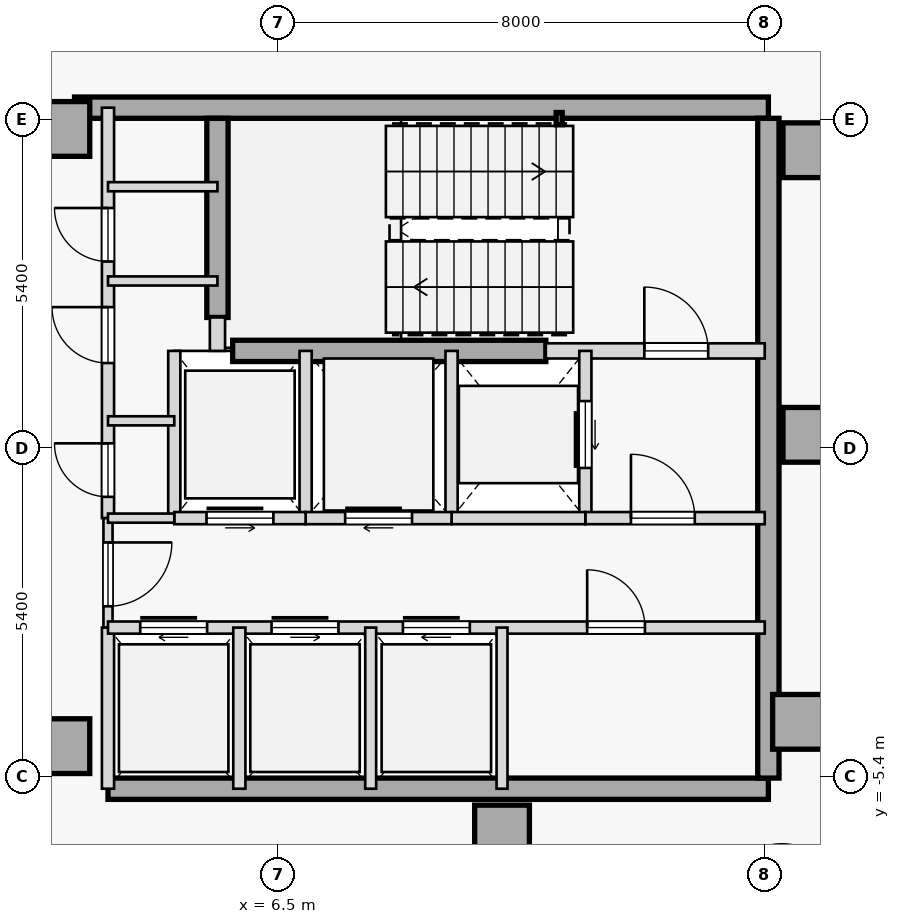
"""IFC4 building model, lengths in metres.
Left out: names, types, materials, properties, quantities, classifications, styles, units other than length and angle.
Written with IfcOpenShell. Run it as: python <this file> out.ifc"""

import sys

from ifc_helpers import new_model, si_unit, direction, frame, frame_2d, origin, origin_2d, place, context, subcontext, project, spatial, rectangle, hollow_rectangle, extrude, element, fill, save


model = new_model("IFC4")
c1 = context("Model", 3, precision=1e-05, world=origin(), true_north=direction((0.0, 1.0)))
c2 = subcontext(c1, "Body", "Model", "MODEL_VIEW")
j1 = project(units=[si_unit("LENGTHUNIT", "METRE"), si_unit("PLANEANGLEUNIT", "RADIAN")], contexts=[c1])
p1 = place(None, origin())
s1 = spatial("IfcSite", under=j1, at=p1, CompositionType="ELEMENT")
p2 = place(p1, origin())
s2 = spatial("IfcBuilding", under=s1, at=p2, CompositionType="ELEMENT")
p3 = place(p2, frame((0.0, 0.0, 206.8)))
s3 = spatial("IfcBuildingStorey", under=s2, at=p3, CompositionType="ELEMENT", Elevation=206.8)
for number, where, z_axis, x_axis in (
    (1, (15.25, 4.9, 0.0), (0.0, 0.0, 1.0), (1.0, 0.0, 0.0)),
    (2, (15.25, 0.22, 0.0), (0.0, 0.0, 1.0), (1.0, 0.0, 0.0)),
    (3, (15.08, -4.5, 0.0), (0.0, 0.0, 1.0), (1.0, 0.0, 0.0)),
    (4, (10.18, -6.32, 0.0), (0.0, 0.0, 1.0), (1.0, 0.0, 0.0)),
    (5, (2.95, -4.9, 0.0), (0.0, 0.0, 1.0), (1.0, 0.0, 0.0)),
    (6, (2.95, 5.25, 0.0), (0.0, 0.0, 1.0), (1.0, 0.0, 0.0)),
):
    element("IfcColumn", number, at=place(p3, frame(where, z_axis=z_axis, x_axis=x_axis)), inside=s3, PredefinedType="COLUMN", context=c2, shape_type="SweptSolid", body=[
        extrude(rectangle(XDim=0.9, YDim=0.9, at=origin_2d()), origin(), (0.0, 0.0, 1.0), 4.1),
    ])
p4 = place(p3, frame((3.15, 5.6, 0.0), z_axis=(0.0, 0.0, 1.0), x_axis=(1.0, 0.0, 0.0)))
e7 = element("IfcWall", 7, at=p4, inside=s3, PredefinedType="SHEAR", context=c2, shape_type="SweptSolid", body=[
    extrude(rectangle(XDim=11.41, YDim=0.35, at=frame_2d((5.705, 0.0))), origin(), (0.0, 0.0, 1.0), 3.875),
])
p5 = place(p3, frame((3.7, -5.6, 0.0), z_axis=(0.0, 0.0, 1.0), x_axis=(1.0, 0.0, 0.0)))
e8 = element("IfcWall", 8, at=p5, inside=s3, PredefinedType="SHEAR", context=c2, shape_type="SweptSolid", body=[
    extrude(rectangle(XDim=10.86, YDim=0.35, at=frame_2d((5.43, 0.0))), origin(), (0.0, 0.0, 1.0), 3.875),
])
p6 = place(p3, frame((14.56, -5.425, 0.0), z_axis=(0.0, 0.0, 1.0), x_axis=(0.0, 1.0, 0.0)))
e9 = element("IfcWall", 9, at=p6, inside=s3, PredefinedType="SHEAR", context=c2, shape_type="SweptSolid", body=[
    extrude(rectangle(XDim=10.85, YDim=0.35, at=frame_2d((5.425, 0.0))), origin(), (0.0, 0.0, 1.0), 3.875),
])
p7 = place(p3, frame((5.5, 2.15, 0.0), z_axis=(0.0, 0.0, 1.0), x_axis=(0.0, 1.0, 0.0)))
e10 = element("IfcWall", 10, at=p7, inside=s3, PredefinedType="SHEAR", context=c2, shape_type="SweptSolid", body=[
    extrude(rectangle(XDim=3.275, YDim=0.35, at=frame_2d((1.638, 0.0))), origin(), (0.0, 0.0, 1.0), 3.875),
])
p8 = place(p3, frame((5.75, 1.6, 0.0), z_axis=(0.0, 0.0, 1.0), x_axis=(1.0, 0.0, 0.0)))
e11 = element("IfcWall", 11, at=p8, inside=s3, PredefinedType="SHEAR", context=c2, shape_type="SweptSolid", body=[
    extrude(rectangle(XDim=5.15, YDim=0.35, at=frame_2d((2.575, 0.0))), origin(), (0.0, 0.0, 1.0), 3.875),
])
p9 = place(p3, frame((11.12, 5.42, 0.0), z_axis=(0.0, 0.0, 1.0), x_axis=(1.0, 0.0, 0.0)))
e12 = element("IfcColumn", 12, at=p9, inside=s3, PredefinedType="COLUMN", context=c2, shape_type="SweptSolid", body=[
    extrude(hollow_rectangle(XDim=0.1, YDim=0.2, WallThickness=0.008, at=origin_2d()), origin(), (0.0, 0.0, 1.0), 4.1),
])
p10 = place(p3, frame((10.9, 1.6, 0.0), z_axis=(0.0, 0.0, 1.0), x_axis=(1.0, 0.0, 0.0)))
e13 = element("IfcWall", 13, at=p10, inside=s3, PredefinedType="STANDARD", context=c2, shape_type="SweptSolid", body=[
    extrude(rectangle(XDim=3.6, YDim=0.25, at=frame_2d((1.8, 0.0))), origin(), (0.0, 0.0, 1.0), 3.875),
])
p11 = place(p10, frame((1.62, 0.0, 0.0)))
e14 = element("IfcOpeningElement", 14, at=p11, cuts=e13, PredefinedType="OPENING", context=c2, shape_type="SweptSolid", body=[
    extrude(rectangle(XDim=1.05, YDim=2.15, at=frame_2d((0.525, 1.075))), frame((0.0, 0.135, 0.0), z_axis=(0.0, -1.0, 0.0), x_axis=(1.0, 0.0, 0.0)), (0.0, 0.0, 1.0), 0.27),
])
p12 = place(p3, frame((5.5, 1.6, 0.0), z_axis=(0.0, 0.0, 1.0), x_axis=(0.0, 1.0, 0.0)))
e15 = element("IfcWall", 15, at=p12, inside=s3, PredefinedType="STANDARD", context=c2, shape_type="SweptSolid", body=[
    extrude(rectangle(XDim=0.55, YDim=0.25, at=frame_2d((0.275, 0.0))), origin(), (0.0, 0.0, 1.0), 3.875),
])
p13 = place(p3, frame((3.7, -1.15, 0.0), z_axis=(0.0, 0.0, 1.0), x_axis=(0.0, 1.0, 0.0)))
e16 = element("IfcWall", 16, at=p13, inside=s3, PredefinedType="STANDARD", context=c2, shape_type="SweptSolid", body=[
    extrude(rectangle(XDim=6.75, YDim=0.2, at=frame_2d((3.375, 0.0))), origin(), (0.0, 0.0, 1.0), 3.875),
])
p14 = place(p13, frame((0.35, 0.0, 0.0)))
e17 = element("IfcOpeningElement", 17, at=p14, cuts=e16, PredefinedType="OPENING", context=c2, shape_type="SweptSolid", body=[
    extrude(rectangle(XDim=0.88, YDim=2.15, at=frame_2d((0.44, 1.075))), frame((0.0, 0.11, 0.0), z_axis=(0.0, -1.0, 0.0), x_axis=(1.0, 0.0, 0.0)), (0.0, 0.0, 1.0), 0.22),
])
p15 = place(p13, frame((2.55, 0.0, 0.0)))
e18 = element("IfcOpeningElement", 18, at=p15, cuts=e16, PredefinedType="OPENING", context=c2, shape_type="SweptSolid", body=[
    extrude(rectangle(XDim=0.92, YDim=2.15, at=frame_2d((0.46, 1.075))), frame((0.0, 0.11, 0.0), z_axis=(0.0, -1.0, 0.0), x_axis=(1.0, 0.0, 0.0)), (0.0, 0.0, 1.0), 0.22),
])
p16 = place(p13, frame((4.22, 0.0, 0.0)))
e19 = element("IfcOpeningElement", 19, at=p16, cuts=e16, PredefinedType="OPENING", context=c2, shape_type="SweptSolid", body=[
    extrude(rectangle(XDim=0.88, YDim=2.15, at=frame_2d((0.44, 1.075))), frame((0.0, 0.11, 0.0), z_axis=(0.0, -1.0, 0.0), x_axis=(1.0, 0.0, 0.0)), (0.0, 0.0, 1.0), 0.22),
])
p17 = place(p3, frame((3.7, -2.95, 0.0), z_axis=(0.0, 0.0, 1.0), x_axis=(0.0, 1.0, 0.0)))
e20 = element("IfcWall", 20, at=p17, inside=s3, PredefinedType="PARTITIONING", context=c2, shape_type="SweptSolid", body=[
    extrude(rectangle(XDim=1.8, YDim=0.15, at=frame_2d((0.9, 0.0))), origin(), (0.0, 0.0, 1.0), 3.875),
])
p18 = place(p17, frame((0.35, 0.0, 0.0)))
e21 = element("IfcOpeningElement", 21, at=p18, cuts=e20, PredefinedType="OPENING", context=c2, shape_type="SweptSolid", body=[
    extrude(rectangle(XDim=1.05, YDim=2.18, at=frame_2d((0.525, 1.09))), frame((0.0, 0.085, 0.0), z_axis=(0.0, -1.0, 0.0), x_axis=(1.0, 0.0, 0.0)), (0.0, 0.0, 1.0), 0.17),
])
p19 = place(p3, frame((3.7, -5.6, 0.0), z_axis=(0.0, 0.0, 1.0), x_axis=(0.0, 1.0, 0.0)))
e22 = element("IfcWall", 22, at=p19, inside=s3, PredefinedType="STANDARD", context=c2, shape_type="SweptSolid", body=[
    extrude(rectangle(XDim=2.65, YDim=0.2, at=frame_2d((1.325, 0.0))), origin(), (0.0, 0.0, 1.0), 3.875),
])
p20 = place(p3, frame((11.55, -1.15, 0.0), z_axis=(0.0, 0.0, 1.0), x_axis=(0.0, 1.0, 0.0)))
e23 = element("IfcWall", 23, at=p20, inside=s3, PredefinedType="STANDARD", context=c2, shape_type="SweptSolid", body=[
    extrude(rectangle(XDim=2.75, YDim=0.2, at=frame_2d((1.375, 0.0))), origin(), (0.0, 0.0, 1.0), 3.875),
])
p21 = place(p20, frame((0.825, 0.0, 0.0)))
e24 = element("IfcOpeningElement", 24, at=p21, cuts=e23, PredefinedType="OPENING", context=c2, shape_type="SweptSolid", body=[
    extrude(rectangle(XDim=1.1, YDim=2.15, at=frame_2d((0.55, 1.075))), frame((0.0, 0.11, 0.0), z_axis=(0.0, -1.0, 0.0), x_axis=(1.0, 0.0, 0.0)), (0.0, 0.0, 1.0), 0.22),
])
p22 = place(p3, frame((9.35, -1.15, 0.0), z_axis=(0.0, 0.0, 1.0), x_axis=(0.0, 1.0, 0.0)))
e25 = element("IfcWall", 25, at=p22, inside=s3, PredefinedType="STANDARD", context=c2, shape_type="SweptSolid", body=[
    extrude(rectangle(XDim=2.75, YDim=0.2, at=frame_2d((1.375, 0.0))), origin(), (0.0, 0.0, 1.0), 3.875),
])
p23 = place(p3, frame((11.55, -1.15, 0.0), z_axis=(0.0, 0.0, 1.0), x_axis=(1.0, 0.0, 0.0)))
e26 = element("IfcWall", 26, at=p23, inside=s3, PredefinedType="STANDARD", context=c2, shape_type="SweptSolid", body=[
    extrude(rectangle(XDim=2.95, YDim=0.2, at=frame_2d((1.475, 0.0))), origin(), (0.0, 0.0, 1.0), 3.875),
])
p24 = place(p23, frame((0.75, 0.0, 0.0)))
e27 = element("IfcOpeningElement", 27, at=p24, cuts=e26, PredefinedType="OPENING", context=c2, shape_type="SweptSolid", body=[
    extrude(rectangle(XDim=1.05, YDim=2.18, at=frame_2d((0.525, 1.09))), frame((0.0, 0.11, 0.0), z_axis=(0.0, -1.0, 0.0), x_axis=(1.0, 0.0, 0.0)), (0.0, 0.0, 1.0), 0.22),
])
p25 = place(p3, frame((9.35, -1.15, 0.0), z_axis=(0.0, 0.0, 1.0), x_axis=(1.0, 0.0, 0.0)))
e28 = element("IfcWall", 28, at=p25, inside=s3, PredefinedType="STANDARD", context=c2, shape_type="SweptSolid", body=[
    extrude(rectangle(XDim=2.2, YDim=0.2, at=frame_2d((1.1, 0.0))), origin(), (0.0, 0.0, 1.0), 3.875),
])
p26 = place(p3, frame((6.95, -1.15, 0.0), z_axis=(0.0, 0.0, 1.0), x_axis=(0.0, 1.0, 0.0)))
e29 = element("IfcWall", 29, at=p26, inside=s3, PredefinedType="STANDARD", context=c2, shape_type="SweptSolid", body=[
    extrude(rectangle(XDim=2.75, YDim=0.2, at=frame_2d((1.375, 0.0))), origin(), (0.0, 0.0, 1.0), 3.875),
])
p27 = place(p3, frame((6.95, -1.15, 0.0), z_axis=(0.0, 0.0, 1.0), x_axis=(1.0, 0.0, 0.0)))
e30 = element("IfcWall", 30, at=p27, inside=s3, PredefinedType="STANDARD", context=c2, shape_type="SweptSolid", body=[
    extrude(rectangle(XDim=2.4, YDim=0.2, at=frame_2d((1.2, 0.0))), origin(), (0.0, 0.0, 1.0), 3.875),
])
p28 = place(p27, frame((0.65, 0.0, 0.0)))
e31 = element("IfcOpeningElement", 31, at=p28, cuts=e30, PredefinedType="OPENING", context=c2, shape_type="SweptSolid", body=[
    extrude(rectangle(XDim=1.1, YDim=2.15, at=frame_2d((0.55, 1.075))), frame((0.0, 0.11, 0.0), z_axis=(0.0, -1.0, 0.0), x_axis=(1.0, 0.0, 0.0)), (0.0, 0.0, 1.0), 0.22),
])
p29 = place(p3, frame((4.79, -1.15, 0.0), z_axis=(0.0, 0.0, 1.0), x_axis=(0.0, 1.0, 0.0)))
e32 = element("IfcWall", 32, at=p29, inside=s3, PredefinedType="STANDARD", context=c2, shape_type="SweptSolid", body=[
    extrude(rectangle(XDim=2.75, YDim=0.2, at=frame_2d((1.375, 0.0))), origin(), (0.0, 0.0, 1.0), 3.875),
])
p30 = place(p3, frame((4.79, -1.15, 0.0), z_axis=(0.0, 0.0, 1.0), x_axis=(1.0, 0.0, 0.0)))
e33 = element("IfcWall", 33, at=p30, inside=s3, PredefinedType="STANDARD", context=c2, shape_type="SweptSolid", body=[
    extrude(rectangle(XDim=2.16, YDim=0.2, at=frame_2d((1.08, 0.0))), origin(), (0.0, 0.0, 1.0), 3.875),
])
p31 = place(p30, frame((0.53, 0.0, 0.0)))
e34 = element("IfcOpeningElement", 34, at=p31, cuts=e33, PredefinedType="OPENING", context=c2, shape_type="SweptSolid", body=[
    extrude(rectangle(XDim=1.1, YDim=2.15, at=frame_2d((0.55, 1.075))), frame((0.0, 0.11, 0.0), z_axis=(0.0, -1.0, 0.0), x_axis=(1.0, 0.0, 0.0)), (0.0, 0.0, 1.0), 0.22),
])
p32 = place(p3, frame((3.7, -1.15, 0.0), z_axis=(0.0, 0.0, 1.0), x_axis=(1.0, 0.0, 0.0)))
e35 = element("IfcWall", 35, at=p32, inside=s3, PredefinedType="PARTITIONING", context=c2, shape_type="SweptSolid", body=[
    extrude(rectangle(XDim=1.09, YDim=0.15, at=frame_2d((0.545, 0.0))), origin(), (0.0, 0.0, 1.0), 3.875),
])
p33 = place(p3, frame((3.7, -2.95, 0.0), z_axis=(0.0, 0.0, 1.0), x_axis=(1.0, 0.0, 0.0)))
e36 = element("IfcWall", 36, at=p33, inside=s3, PredefinedType="STANDARD", context=c2, shape_type="SweptSolid", body=[
    extrude(rectangle(XDim=10.8, YDim=0.2, at=frame_2d((5.4, 0.0))), origin(), (0.0, 0.0, 1.0), 3.875),
])
p34 = place(p33, frame((0.53, 0.0, 0.0)))
e37 = element("IfcOpeningElement", 37, at=p34, cuts=e36, PredefinedType="OPENING", context=c2, shape_type="SweptSolid", body=[
    extrude(rectangle(XDim=1.1, YDim=2.15, at=frame_2d((0.55, 1.075))), frame((0.0, 0.11, 0.0), z_axis=(0.0, -1.0, 0.0), x_axis=(1.0, 0.0, 0.0)), (0.0, 0.0, 1.0), 0.22),
])
p35 = place(p33, frame((2.69, 0.0, 0.0)))
e38 = element("IfcOpeningElement", 38, at=p35, cuts=e36, PredefinedType="OPENING", context=c2, shape_type="SweptSolid", body=[
    extrude(rectangle(XDim=1.1, YDim=2.15, at=frame_2d((0.55, 1.075))), frame((0.0, 0.11, 0.0), z_axis=(0.0, -1.0, 0.0), x_axis=(1.0, 0.0, 0.0)), (0.0, 0.0, 1.0), 0.22),
])
p36 = place(p33, frame((4.85, 0.0, 0.0)))
e39 = element("IfcOpeningElement", 39, at=p36, cuts=e36, PredefinedType="OPENING", context=c2, shape_type="SweptSolid", body=[
    extrude(rectangle(XDim=1.1, YDim=2.15, at=frame_2d((0.55, 1.075))), frame((0.0, 0.11, 0.0), z_axis=(0.0, -1.0, 0.0), x_axis=(1.0, 0.0, 0.0)), (0.0, 0.0, 1.0), 0.22),
])
p37 = place(p33, frame((7.88, 0.0, 0.0)))
e40 = element("IfcOpeningElement", 40, at=p37, cuts=e36, PredefinedType="OPENING", context=c2, shape_type="SweptSolid", body=[
    extrude(rectangle(XDim=0.95, YDim=2.15, at=frame_2d((0.475, 1.075))), frame((0.0, 0.11, 0.0), z_axis=(0.0, -1.0, 0.0), x_axis=(1.0, 0.0, 0.0)), (0.0, 0.0, 1.0), 0.22),
])
p38 = place(p3, frame((5.86, -5.6, 0.0), z_axis=(0.0, 0.0, 1.0), x_axis=(0.0, 1.0, 0.0)))
e41 = element("IfcWall", 41, at=p38, inside=s3, PredefinedType="STANDARD", context=c2, shape_type="SweptSolid", body=[
    extrude(rectangle(XDim=2.65, YDim=0.2, at=frame_2d((1.325, 0.0))), origin(), (0.0, 0.0, 1.0), 3.875),
])
for number, where, z_axis, x_axis in (
    (42, (10.18, -5.6, 0.0), (0.0, 0.0, 1.0), (0.0, 1.0, 0.0)),
    (43, (8.02, -5.6, 0.0), (0.0, 0.0, 1.0), (0.0, 1.0, 0.0)),
):
    element("IfcWall", number, at=place(p3, frame(where, z_axis=z_axis, x_axis=x_axis)), inside=s3, PredefinedType="STANDARD", context=c2, shape_type="SweptSolid", body=[
        extrude(rectangle(XDim=2.65, YDim=0.18, at=frame_2d((1.325, 0.0))), origin(), (0.0, 0.0, 1.0), 3.875),
    ])
p39 = place(p3, frame((3.7, 4.3, 0.0), z_axis=(0.0, 0.0, 1.0), x_axis=(1.0, 0.0, 0.0)))
e44 = element("IfcWall", 44, at=p39, inside=s3, PredefinedType="PARTITIONING", context=c2, shape_type="SweptSolid", body=[
    extrude(rectangle(XDim=1.8, YDim=0.15, at=frame_2d((0.9, 0.0))), origin(), (0.0, 0.0, 1.0), 3.875),
])
p40 = place(p3, frame((3.7, 0.45, 0.0), z_axis=(0.0, 0.0, 1.0), x_axis=(1.0, 0.0, 0.0)))
e45 = element("IfcWall", 45, at=p40, inside=s3, PredefinedType="PARTITIONING", context=c2, shape_type="SweptSolid", body=[
    extrude(rectangle(XDim=1.09, YDim=0.15, at=frame_2d((0.545, 0.0))), origin(), (0.0, 0.0, 1.0), 3.875),
])
p41 = place(p3, frame((3.7, 2.75, 0.0), z_axis=(0.0, 0.0, 1.0), x_axis=(1.0, 0.0, 0.0)))
e46 = element("IfcWall", 46, at=p41, inside=s3, PredefinedType="PARTITIONING", context=c2, shape_type="SweptSolid", body=[
    extrude(rectangle(XDim=1.8, YDim=0.15, at=frame_2d((0.9, 0.0))), origin(), (0.0, 0.0, 1.0), 3.875),
])
p42 = place(p3, frame((10.038, -8.995, 0.0), z_axis=(0.0, 0.0, 1.0), x_axis=(0.951055575401, 0.309019890135, 0.0)))
e47 = element("IfcWall", 47, at=p42, inside=s3, PredefinedType="PARTITIONING", context=c2, shape_type="SweptSolid", body=[
    extrude(rectangle(XDim=10.927, YDim=0.15, at=frame_2d((5.464, 0.0))), origin(), (0.0, 0.0, 1.0), 3.875),
])
p43 = place(p42, frame((4.989, 0.0, 0.0)))
e48 = element("IfcOpeningElement", 48, at=p43, cuts=e47, PredefinedType="OPENING", context=c2, shape_type="SweptSolid", body=[
    extrude(rectangle(XDim=0.95, YDim=2.15, at=frame_2d((0.475, 1.075))), frame((0.0, 0.085, 0.0), z_axis=(0.0, -1.0, 0.0), x_axis=(1.0, 0.0, 0.0)), (0.0, 0.0, 1.0), 0.17),
])
p44 = place(p11, origin())
e49 = element("IfcDoor", 49, at=p44, inside=s3, OperationType="SINGLE_SWING_LEFT", PredefinedType="DOOR", context=c2, shape_type="SweptSolid", body=[
    extrude(rectangle(XDim=1.05, YDim=2.15, at=frame_2d((0.525, 1.075))), frame((0.0, 0.025, 0.0), z_axis=(0.0, -1.0, 0.0), x_axis=(1.0, 0.0, 0.0)), (0.0, 0.0, 1.0), 0.05),
])
fill(e14, e49)
p45 = place(p24, origin())
e50 = element("IfcDoor", 50, at=p45, inside=s3, OperationType="SINGLE_SWING_LEFT", PredefinedType="DOOR", context=c2, shape_type="SweptSolid", body=[
    extrude(rectangle(XDim=1.05, YDim=2.18, at=frame_2d((0.525, 1.09))), frame((0.0, 0.025, 0.0), z_axis=(0.0, -1.0, 0.0), x_axis=(1.0, 0.0, 0.0)), (0.0, 0.0, 1.0), 0.05),
])
fill(e27, e50)
p46 = place(p18, frame((1.05, 0.0, 0.0), z_axis=(0.0, 0.0, 1.0), x_axis=(-1.0, 0.0, 0.0)))
e51 = element("IfcDoor", 51, at=p46, inside=s3, OperationType="SINGLE_SWING_RIGHT", PredefinedType="DOOR", context=c2, shape_type="SweptSolid", body=[
    extrude(rectangle(XDim=1.05, YDim=2.18, at=frame_2d((0.525, 1.09))), frame((0.0, 0.025, 0.0), z_axis=(0.0, -1.0, 0.0), x_axis=(1.0, 0.0, 0.0)), (0.0, 0.0, 1.0), 0.05),
])
fill(e21, e51)
p47 = place(p21, origin())
e52 = element("IfcDoor", 52, at=p47, inside=s3, OperationType="SLIDING_TO_RIGHT", PredefinedType="DOOR", context=c2, shape_type="SweptSolid", body=[
    extrude(rectangle(XDim=1.1, YDim=2.15, at=frame_2d((0.55, 1.075))), frame((0.0, 0.025, 0.0), z_axis=(0.0, -1.0, 0.0), x_axis=(1.0, 0.0, 0.0)), (0.0, 0.0, 1.0), 0.05),
])
fill(e24, e52)
p48 = place(p28, origin())
e53 = element("IfcDoor", 53, at=p48, inside=s3, OperationType="SLIDING_TO_RIGHT", PredefinedType="DOOR", context=c2, shape_type="SweptSolid", body=[
    extrude(rectangle(XDim=1.1, YDim=2.15, at=frame_2d((0.55, 1.075))), frame((0.0, 0.025, 0.0), z_axis=(0.0, -1.0, 0.0), x_axis=(1.0, 0.0, 0.0)), (0.0, 0.0, 1.0), 0.05),
])
fill(e31, e53)
p49 = place(p31, origin())
e54 = element("IfcDoor", 54, at=p49, inside=s3, OperationType="SLIDING_TO_LEFT", PredefinedType="DOOR", context=c2, shape_type="SweptSolid", body=[
    extrude(rectangle(XDim=1.1, YDim=2.15, at=frame_2d((0.55, 1.075))), frame((0.0, 0.025, 0.0), z_axis=(0.0, -1.0, 0.0), x_axis=(1.0, 0.0, 0.0)), (0.0, 0.0, 1.0), 0.05),
])
fill(e34, e54)
p50 = place(p34, origin())
e55 = element("IfcDoor", 55, at=p50, inside=s3, OperationType="SLIDING_TO_RIGHT", PredefinedType="DOOR", context=c2, shape_type="SweptSolid", body=[
    extrude(rectangle(XDim=1.1, YDim=2.15, at=frame_2d((0.55, 1.075))), frame((0.0, 0.025, 0.0), z_axis=(0.0, -1.0, 0.0), x_axis=(1.0, 0.0, 0.0)), (0.0, 0.0, 1.0), 0.05),
])
fill(e37, e55)
p51 = place(p35, origin())
e56 = element("IfcDoor", 56, at=p51, inside=s3, OperationType="SLIDING_TO_LEFT", PredefinedType="DOOR", context=c2, shape_type="SweptSolid", body=[
    extrude(rectangle(XDim=1.1, YDim=2.15, at=frame_2d((0.55, 1.075))), frame((0.0, 0.025, 0.0), z_axis=(0.0, -1.0, 0.0), x_axis=(1.0, 0.0, 0.0)), (0.0, 0.0, 1.0), 0.05),
])
fill(e38, e56)
p52 = place(p36, origin())
e57 = element("IfcDoor", 57, at=p52, inside=s3, OperationType="SLIDING_TO_RIGHT", PredefinedType="DOOR", context=c2, shape_type="SweptSolid", body=[
    extrude(rectangle(XDim=1.1, YDim=2.15, at=frame_2d((0.55, 1.075))), frame((0.0, 0.025, 0.0), z_axis=(0.0, -1.0, 0.0), x_axis=(1.0, 0.0, 0.0)), (0.0, 0.0, 1.0), 0.05),
])
fill(e39, e57)
p53 = place(p37, origin())
e58 = element("IfcDoor", 58, at=p53, inside=s3, OperationType="SINGLE_SWING_LEFT", PredefinedType="DOOR", context=c2, shape_type="SweptSolid", body=[
    extrude(rectangle(XDim=0.95, YDim=2.15, at=frame_2d((0.475, 1.075))), frame((0.0, 0.025, 0.0), z_axis=(0.0, -1.0, 0.0), x_axis=(1.0, 0.0, 0.0)), (0.0, 0.0, 1.0), 0.05),
])
fill(e40, e58)
p54 = place(p14, origin())
e59 = element("IfcDoor", 59, at=p54, inside=s3, OperationType="SINGLE_SWING_RIGHT", PredefinedType="DOOR", context=c2, shape_type="SweptSolid", body=[
    extrude(rectangle(XDim=0.88, YDim=2.15, at=frame_2d((0.44, 1.075))), frame((0.0, 0.025, 0.0), z_axis=(0.0, -1.0, 0.0), x_axis=(1.0, 0.0, 0.0)), (0.0, 0.0, 1.0), 0.05),
])
fill(e17, e59)
p55 = place(p15, origin())
e60 = element("IfcDoor", 60, at=p55, inside=s3, OperationType="SINGLE_SWING_RIGHT", PredefinedType="DOOR", context=c2, shape_type="SweptSolid", body=[
    extrude(rectangle(XDim=0.92, YDim=2.15, at=frame_2d((0.46, 1.075))), frame((0.0, 0.025, 0.0), z_axis=(0.0, -1.0, 0.0), x_axis=(1.0, 0.0, 0.0)), (0.0, 0.0, 1.0), 0.05),
])
fill(e18, e60)
p56 = place(p16, origin())
e61 = element("IfcDoor", 61, at=p56, inside=s3, OperationType="SINGLE_SWING_RIGHT", PredefinedType="DOOR", context=c2, shape_type="SweptSolid", body=[
    extrude(rectangle(XDim=0.88, YDim=2.15, at=frame_2d((0.44, 1.075))), frame((0.0, 0.025, 0.0), z_axis=(0.0, -1.0, 0.0), x_axis=(1.0, 0.0, 0.0)), (0.0, 0.0, 1.0), 0.05),
])
fill(e19, e61)
save(model, sys.argv[1])
